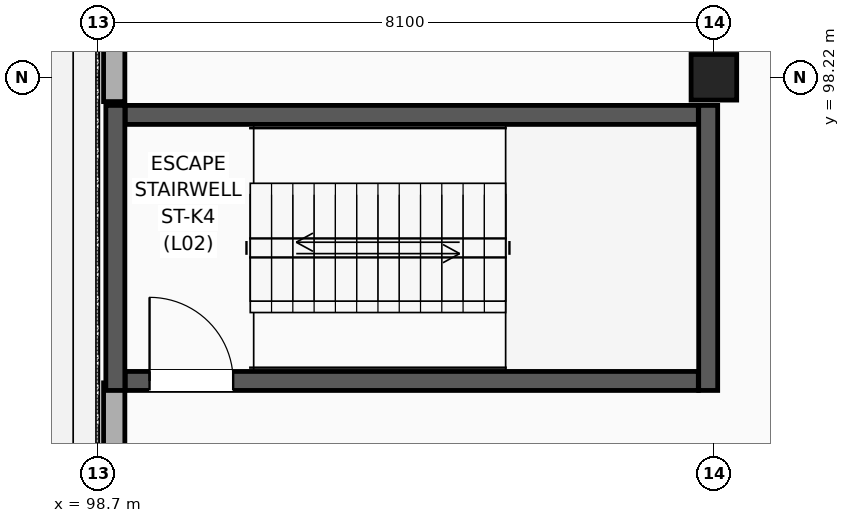
"""IFC4 building model, lengths in metres.
Left out: names, types, materials, properties, quantities, classifications, styles, units other than length and angle.
Written with IfcOpenShell. Run it as: python <this file> out.ifc"""

import sys

from ifc_helpers import new_model, si_unit, direction, frame, frame_2d, origin, origin_2d, place, context, subcontext, project, spatial, rectangle, extrude, element, fill, save


model = new_model("IFC4")
c1 = context("Model", 3, precision=1e-05, world=origin(), true_north=direction((0.0, 1.0)))
c2 = subcontext(c1, "Body", "Model", "MODEL_VIEW")
j1 = project(units=[si_unit("LENGTHUNIT", "METRE"), si_unit("PLANEANGLEUNIT", "RADIAN")], contexts=[c1])
p1 = place(None, origin())
s1 = spatial("IfcSite", under=j1, at=p1, CompositionType="ELEMENT")
p2 = place(p1, origin())
s2 = spatial("IfcBuilding", under=s1, at=p2, CompositionType="ELEMENT")
p3 = place(p2, frame((0.0, 0.0, 10.2)))
s3 = spatial("IfcBuildingStorey", under=s2, at=p3, CompositionType="ELEMENT", Elevation=10.2)
p4 = place(p3, frame((106.8, 98.22, 0.0), z_axis=(0.0, 0.0, 1.0), x_axis=(1.0, 0.0, 0.0)))
e1 = element("IfcColumn", 1, at=p4, inside=s3, PredefinedType="COLUMN", context=c2, shape_type="SweptSolid", body=[
    extrude(rectangle(XDim=0.6, YDim=0.6, at=origin_2d()), origin(), (0.0, 0.0, 1.0), 4.5),
])
p5 = place(p3, frame((98.91, 88.4, 0.0), z_axis=(0.0, 0.0, 1.0), x_axis=(0.0, 1.0, 0.0)))
e2 = element("IfcWall", 2, at=p5, inside=s3, PredefinedType="SOLIDWALL", context=c2, shape_type="SweptSolid", body=[
    extrude(rectangle(XDim=5.8, YDim=0.28, at=frame_2d((2.9, 0.0))), origin(), (0.0, 0.0, 1.0), 4.205),
])
p6 = place(p3, frame((98.91, 97.9, 0.0), z_axis=(0.0, 0.0, 1.0), x_axis=(0.0, 1.0, 0.0)))
e3 = element("IfcWall", 3, at=p6, inside=s3, PredefinedType="SOLIDWALL", context=c2, shape_type="SweptSolid", body=[
    extrude(rectangle(XDim=15.05, YDim=0.28, at=frame_2d((7.525, 0.0))), origin(), (0.0, 0.0, 1.0), 4.205),
])
p7 = place(p3, frame((99.055, 94.225, 0.0), z_axis=(0.0, 0.0, 1.0), x_axis=(1.0, 0.0, 0.0)))
e4 = element("IfcWall", 4, at=p7, inside=s3, PredefinedType="SHEAR", context=c2, shape_type="SweptSolid", body=[
    extrude(rectangle(XDim=7.54, YDim=0.25, at=frame_2d((3.77, 0.0))), origin(), (0.0, 0.0, 1.0), 4.225),
])
p8 = place(p7, frame((0.32, 0.0, 0.0)))
e5 = element("IfcOpeningElement", 5, at=p8, cuts=e4, PredefinedType="OPENING", context=c2, shape_type="SweptSolid", body=[
    extrude(rectangle(XDim=1.1, YDim=2.2, at=frame_2d((0.55, 1.1))), frame((0.0, 0.135, 0.0), z_axis=(0.0, -1.0, 0.0), x_axis=(1.0, 0.0, 0.0)), (0.0, 0.0, 1.0), 0.27),
])
p9 = place(p3, frame((99.055, 97.725, 0.0), z_axis=(0.0, 0.0, 1.0), x_axis=(1.0, 0.0, 0.0)))
e6 = element("IfcWall", 6, at=p9, inside=s3, PredefinedType="SHEAR", context=c2, shape_type="SweptSolid", body=[
    extrude(rectangle(XDim=7.54, YDim=0.25, at=frame_2d((3.77, 0.0))), origin(), (0.0, 0.0, 1.0), 4.225),
])
for number, where, z_axis, x_axis in (
    (7, (98.925, 94.1, 0.0), (0.0, 0.0, 1.0), (0.0, 1.0, 0.0)),
    (8, (106.725, 94.1, 0.0), (0.0, 0.0, 1.0), (0.0, 1.0, 0.0)),
):
    element("IfcWall", number, at=place(p3, frame(where, z_axis=z_axis, x_axis=x_axis)), inside=s3, PredefinedType="SHEAR", context=c2, shape_type="SweptSolid", body=[
        extrude(rectangle(XDim=3.75, YDim=0.25, at=frame_2d((1.875, 0.0))), origin(), (0.0, 0.0, 1.0), 4.225),
    ])
p10 = place(p8, origin())
e9 = element("IfcDoor", 9, at=p10, inside=s3, OperationType="SINGLE_SWING_LEFT", PredefinedType="DOOR", context=c2, shape_type="SweptSolid", body=[
    extrude(rectangle(XDim=1.1, YDim=2.2, at=frame_2d((0.55, 1.1))), frame((0.0, 0.025, 0.0), z_axis=(0.0, -1.0, 0.0), x_axis=(1.0, 0.0, 0.0)), (0.0, 0.0, 1.0), 0.05),
])
fill(e5, e9)
save(model, sys.argv[1])
